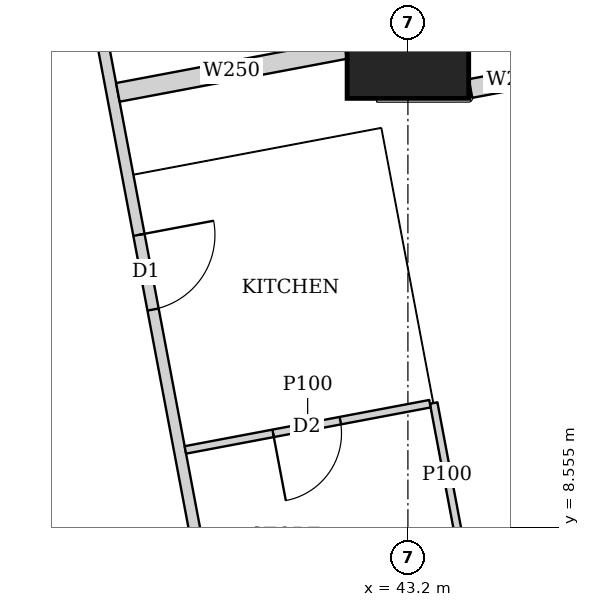
"""IFC4 building model, lengths in metres.
Left out: names, types, materials, properties, quantities, classifications, styles, units other than length and angle.
Written with IfcOpenShell. Run it as: python <this file> out.ifc"""

import sys

from ifc_helpers import new_model, si_unit, direction, frame, frame_2d, origin, origin_2d, place, context, subcontext, project, spatial, rectangle, extrude, element, fill, save


model = new_model("IFC4")
c1 = context("Model", 3, precision=1e-05, world=origin(), true_north=direction((0.0, 1.0)))
c2 = subcontext(c1, "Body", "Model", "MODEL_VIEW")
j1 = project(units=[si_unit("LENGTHUNIT", "METRE"), si_unit("PLANEANGLEUNIT", "RADIAN")], contexts=[c1])
p1 = place(None, origin())
s1 = spatial("IfcSite", under=j1, at=p1, CompositionType="ELEMENT")
p2 = place(p1, origin())
s2 = spatial("IfcBuilding", under=s1, at=p2, CompositionType="ELEMENT")
p3 = place(p2, frame((0.0, 0.0, 126.65)))
s3 = spatial("IfcBuildingStorey", under=s2, at=p3, CompositionType="ELEMENT", Elevation=126.65)
p4 = place(p3, frame((43.2, 15.0, 0.0), z_axis=(0.0, 0.0, 1.0), x_axis=(1.0, 0.0, 0.0)))
e1 = element("IfcColumn", 1, at=p4, inside=s3, PredefinedType="COLUMN", context=c2, shape_type="SweptSolid", body=[
    extrude(rectangle(XDim=1.6, YDim=1.6, at=origin_2d()), origin(), (0.0, 0.0, 1.0), 3.75),
])
p5 = place(p3, frame((50.653, 2.703, 0.0), z_axis=(0.0, 0.0, 1.0), x_axis=(-0.185612026696, 0.982623109613, 0.0)))
e2 = element("IfcWall", 2, at=p5, inside=s3, PredefinedType="SOLIDWALL", context=c2, shape_type="SweptSolid", body=[
    extrude(rectangle(XDim=41.393, YDim=0.2, at=frame_2d((20.697, 0.0))), origin(), (0.0, 0.0, 1.0), 3.45),
])
p6 = place(p5, frame((1.633, 0.0, 0.9)))
e3 = element("IfcOpeningElement", 3, at=p6, cuts=e2, PredefinedType="OPENING", context=c2, shape_type="SweptSolid", body=[
    extrude(rectangle(XDim=1.8, YDim=1.5, at=frame_2d((0.9, 0.75))), frame((0.0, 0.11, 0.0), z_axis=(0.0, -1.0, 0.0), x_axis=(1.0, 0.0, 0.0)), (0.0, 0.0, 1.0), 0.22),
])
p7 = place(p5, frame((6.032, 0.0, 0.9)))
e4 = element("IfcOpeningElement", 4, at=p7, cuts=e2, PredefinedType="OPENING", context=c2, shape_type="SweptSolid", body=[
    extrude(rectangle(XDim=1.8, YDim=1.5, at=frame_2d((0.9, 0.75))), frame((0.0, 0.11, 0.0), z_axis=(0.0, -1.0, 0.0), x_axis=(1.0, 0.0, 0.0)), (0.0, 0.0, 1.0), 0.22),
])
p8 = place(p5, frame((9.848, 0.0, 0.9)))
e5 = element("IfcOpeningElement", 5, at=p8, cuts=e2, PredefinedType="OPENING", context=c2, shape_type="SweptSolid", body=[
    extrude(rectangle(XDim=1.8, YDim=1.5, at=frame_2d((0.9, 0.75))), frame((0.0, 0.11, 0.0), z_axis=(0.0, -1.0, 0.0), x_axis=(1.0, 0.0, 0.0)), (0.0, 0.0, 1.0), 0.22),
])
p9 = place(p5, frame((13.664, 0.0, 0.9)))
e6 = element("IfcOpeningElement", 6, at=p9, cuts=e2, PredefinedType="OPENING", context=c2, shape_type="SweptSolid", body=[
    extrude(rectangle(XDim=1.8, YDim=1.5, at=frame_2d((0.9, 0.75))), frame((0.0, 0.11, 0.0), z_axis=(0.0, -1.0, 0.0), x_axis=(1.0, 0.0, 0.0)), (0.0, 0.0, 1.0), 0.22),
])
p10 = place(p5, frame((17.481, 0.0, 0.9)))
e7 = element("IfcOpeningElement", 7, at=p10, cuts=e2, PredefinedType="OPENING", context=c2, shape_type="SweptSolid", body=[
    extrude(rectangle(XDim=1.8, YDim=1.5, at=frame_2d((0.9, 0.75))), frame((0.0, 0.11, 0.0), z_axis=(0.0, -1.0, 0.0), x_axis=(1.0, 0.0, 0.0)), (0.0, 0.0, 1.0), 0.22),
])
p11 = place(p5, frame((21.297, 0.0, 0.9)))
e8 = element("IfcOpeningElement", 8, at=p11, cuts=e2, PredefinedType="OPENING", context=c2, shape_type="SweptSolid", body=[
    extrude(rectangle(XDim=1.8, YDim=1.5, at=frame_2d((0.9, 0.75))), frame((0.0, 0.11, 0.0), z_axis=(0.0, -1.0, 0.0), x_axis=(1.0, 0.0, 0.0)), (0.0, 0.0, 1.0), 0.22),
])
p12 = place(p5, frame((25.113, 0.0, 0.9)))
e9 = element("IfcOpeningElement", 9, at=p12, cuts=e2, PredefinedType="OPENING", context=c2, shape_type="SweptSolid", body=[
    extrude(rectangle(XDim=1.8, YDim=1.5, at=frame_2d((0.9, 0.75))), frame((0.0, 0.11, 0.0), z_axis=(0.0, -1.0, 0.0), x_axis=(1.0, 0.0, 0.0)), (0.0, 0.0, 1.0), 0.22),
])
p13 = place(p5, frame((28.93, 0.0, 0.9)))
e10 = element("IfcOpeningElement", 10, at=p13, cuts=e2, PredefinedType="OPENING", context=c2, shape_type="SweptSolid", body=[
    extrude(rectangle(XDim=1.8, YDim=1.5, at=frame_2d((0.9, 0.75))), frame((0.0, 0.11, 0.0), z_axis=(0.0, -1.0, 0.0), x_axis=(1.0, 0.0, 0.0)), (0.0, 0.0, 1.0), 0.22),
])
p14 = place(p5, frame((32.746, 0.0, 0.9)))
e11 = element("IfcOpeningElement", 11, at=p14, cuts=e2, PredefinedType="OPENING", context=c2, shape_type="SweptSolid", body=[
    extrude(rectangle(XDim=1.8, YDim=1.5, at=frame_2d((0.9, 0.75))), frame((0.0, 0.11, 0.0), z_axis=(0.0, -1.0, 0.0), x_axis=(1.0, 0.0, 0.0)), (0.0, 0.0, 1.0), 0.22),
])
p15 = place(p5, frame((36.481, 0.0, 0.9)))
e12 = element("IfcOpeningElement", 12, at=p15, cuts=e2, PredefinedType="OPENING", context=c2, shape_type="SweptSolid", body=[
    extrude(rectangle(XDim=1.8, YDim=1.5, at=frame_2d((0.9, 0.75))), frame((0.0, 0.11, 0.0), z_axis=(0.0, -1.0, 0.0), x_axis=(1.0, 0.0, 0.0)), (0.0, 0.0, 1.0), 0.22),
])
p16 = place(p3, frame((33.896, 42.929, 0.0), z_axis=(0.0, 0.0, 1.0), x_axis=(0.1855961604, -0.982626106535, 0.0)))
e13 = element("IfcWall", 13, at=p16, inside=s3, PredefinedType="SOLIDWALL", context=c2, shape_type="SweptSolid", body=[
    extrude(rectangle(XDim=41.456, YDim=0.15, at=frame_2d((20.728, 0.0))), origin(), (0.0, 0.0, 1.0), 2.45),
])
p17 = place(p16, frame((7.893, 0.0, 0.0)))
e14 = element("IfcOpeningElement", 14, at=p17, cuts=e13, PredefinedType="OPENING", context=c2, shape_type="SweptSolid", body=[
    extrude(rectangle(XDim=1.0, YDim=2.1, at=frame_2d((0.5, 1.05))), frame((0.0, 0.085, 0.0), z_axis=(0.0, -1.0, 0.0), x_axis=(1.0, 0.0, 0.0)), (0.0, 0.0, 1.0), 0.17),
])
p18 = place(p16, frame((12.468, 0.0, 0.0)))
e15 = element("IfcOpeningElement", 15, at=p18, cuts=e13, PredefinedType="OPENING", context=c2, shape_type="SweptSolid", body=[
    extrude(rectangle(XDim=1.0, YDim=2.1, at=frame_2d((0.5, 1.05))), frame((0.0, 0.085, 0.0), z_axis=(0.0, -1.0, 0.0), x_axis=(1.0, 0.0, 0.0)), (0.0, 0.0, 1.0), 0.17),
])
p19 = place(p16, frame((20.101, 0.0, 0.0)))
e16 = element("IfcOpeningElement", 16, at=p19, cuts=e13, PredefinedType="OPENING", context=c2, shape_type="SweptSolid", body=[
    extrude(rectangle(XDim=1.0, YDim=2.1, at=frame_2d((0.5, 1.05))), frame((0.0, 0.085, 0.0), z_axis=(0.0, -1.0, 0.0), x_axis=(1.0, 0.0, 0.0)), (0.0, 0.0, 1.0), 0.17),
])
p20 = place(p16, frame((31.064, 0.0, 0.0)))
e17 = element("IfcOpeningElement", 17, at=p20, cuts=e13, PredefinedType="OPENING", context=c2, shape_type="SweptSolid", body=[
    extrude(rectangle(XDim=1.0, YDim=2.1, at=frame_2d((0.5, 1.05))), frame((0.0, 0.085, 0.0), z_axis=(0.0, -1.0, 0.0), x_axis=(1.0, 0.0, 0.0)), (0.0, 0.0, 1.0), 0.17),
])
p21 = place(p3, frame((43.539, 10.192, 0.0), z_axis=(0.0, 0.0, 1.0), x_axis=(0.185366049966, -0.982669541362, 0.0)))
e18 = element("IfcWall", 18, at=p21, inside=s3, PredefinedType="PARTITIONING", context=c2, shape_type="SweptSolid", body=[
    extrude(rectangle(XDim=1.915, YDim=0.1, at=frame_2d((0.958, 0.0))), origin(), (0.0, 0.0, 1.0), 3.45),
])
p22 = place(p3, frame((43.49, 10.183, 0.0), z_axis=(0.0, 0.0, 1.0), x_axis=(-0.982607026909, -0.185697147715, 0.0)))
e19 = element("IfcWall", 19, at=p22, inside=s3, PredefinedType="PARTITIONING", context=c2, shape_type="SweptSolid", body=[
    extrude(rectangle(XDim=3.275, YDim=0.1, at=frame_2d((1.637, 0.0))), origin(), (0.0, 0.0, 1.0), 3.45),
])
p23 = place(p22, frame((1.2, 0.0, 0.0)))
e20 = element("IfcOpeningElement", 20, at=p23, cuts=e19, PredefinedType="OPENING", context=c2, shape_type="SweptSolid", body=[
    extrude(rectangle(XDim=0.9, YDim=2.1, at=frame_2d((0.45, 1.05))), frame((0.0, 0.06, 0.0), z_axis=(0.0, -1.0, 0.0), x_axis=(1.0, 0.0, 0.0)), (0.0, 0.0, 1.0), 0.12),
])
p24 = place(p3, frame((45.19, 14.55, 0.0), z_axis=(0.0, 0.0, 1.0), x_axis=(-0.982666604435, -0.185381618634, 0.0)))
e21 = element("IfcWall", 21, at=p24, inside=s3, PredefinedType="SOLIDWALL", context=c2, shape_type="SweptSolid", body=[
    extrude(rectangle(XDim=1.187, YDim=0.25, at=frame_2d((0.593, 0.0))), origin(), (0.0, 0.0, 1.0), 3.45),
])
p25 = place(p3, frame((42.376, 14.844, 0.0), z_axis=(0.0, 0.0, 1.0), x_axis=(-0.982636286056, -0.185542257522, 0.0)))
e22 = element("IfcWall", 22, at=p25, inside=s3, PredefinedType="SOLIDWALL", context=c2, shape_type="SweptSolid", body=[
    extrude(rectangle(XDim=3.045, YDim=0.25, at=frame_2d((1.522, 0.0))), origin(), (0.0, 0.0, 1.0), 3.45),
])
p26 = place(p20, origin())
e23 = element("IfcDoor", 23, at=p26, inside=s3, OperationType="SINGLE_SWING_LEFT", PredefinedType="DOOR", context=c2, shape_type="SweptSolid", body=[
    extrude(rectangle(XDim=1.0, YDim=2.1, at=frame_2d((0.5, 1.05))), frame((0.0, 0.025, 0.0), z_axis=(0.0, -1.0, 0.0), x_axis=(1.0, 0.0, 0.0)), (0.0, 0.0, 1.0), 0.05),
])
fill(e17, e23)
p27 = place(p23, origin())
e24 = element("IfcDoor", 24, at=p27, inside=s3, OperationType="SINGLE_SWING_RIGHT", PredefinedType="DOOR", context=c2, shape_type="SweptSolid", body=[
    extrude(rectangle(XDim=0.9, YDim=2.1, at=frame_2d((0.45, 1.05))), frame((0.0, 0.025, 0.0), z_axis=(0.0, -1.0, 0.0), x_axis=(1.0, 0.0, 0.0)), (0.0, 0.0, 1.0), 0.05),
])
fill(e20, e24)
save(model, sys.argv[1])
